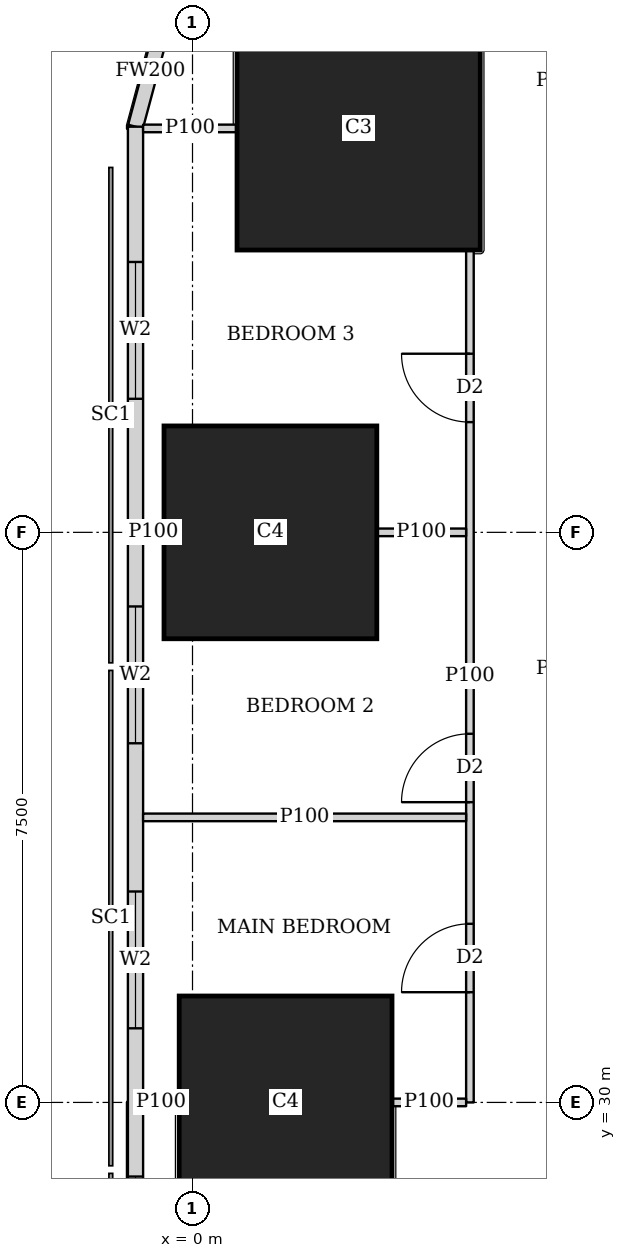
"""IFC4 building model, lengths in metres.
Left out: names, types, materials, properties, quantities, classifications, styles, units other than length and angle.
Written with IfcOpenShell. Run it as: python <this file> out.ifc"""

import sys

from ifc_helpers import new_model, si_unit, direction, frame, frame_2d, origin, origin_2d, place, context, subcontext, project, spatial, rectangle, extrude, element, fill, save


model = new_model("IFC4")
c1 = context("Model", 3, precision=1e-05, world=origin(), true_north=direction((0.0, 1.0)))
c2 = subcontext(c1, "Body", "Model", "MODEL_VIEW")
j1 = project(units=[si_unit("LENGTHUNIT", "METRE"), si_unit("PLANEANGLEUNIT", "RADIAN")], contexts=[c1])
p1 = place(None, origin())
s1 = spatial("IfcSite", under=j1, at=p1, CompositionType="ELEMENT")
p2 = place(p1, origin())
s2 = spatial("IfcBuilding", under=s1, at=p2, CompositionType="ELEMENT")
p3 = place(p2, frame((0.0, 0.0, 68.75)))
s3 = spatial("IfcBuildingStorey", under=s2, at=p3, CompositionType="ELEMENT", Elevation=68.75)
for number, where, z_axis, x_axis in (
    (1, (1.225, 30.0, 0.0), (0.0, 0.0, 1.0), (1.0, 0.0, 0.0)),
    (2, (1.025, 37.5, 0.0), (0.0, 0.0, 1.0), (1.0, 0.0, 0.0)),
):
    element("IfcColumn", number, at=place(p3, frame(where, z_axis=z_axis, x_axis=x_axis)), inside=s3, PredefinedType="COLUMN", context=c2, shape_type="SweptSolid", body=[
        extrude(rectangle(XDim=2.8, YDim=2.8, at=origin_2d()), origin(), (0.0, 0.0, 1.0), 3.75),
    ])
p4 = place(p3, frame((2.186, 42.814, 0.0), z_axis=(0.0, 0.0, 1.0), x_axis=(1.0, 0.0, 0.0)))
e3 = element("IfcColumn", 3, at=p4, inside=s3, PredefinedType="COLUMN", context=c2, shape_type="SweptSolid", body=[
    extrude(rectangle(XDim=3.2, YDim=3.2, at=origin_2d()), origin(), (0.0, 0.0, 1.0), 3.75),
])
p5 = place(p3, frame((-0.358, 44.298, 0.0), z_axis=(0.0, 0.0, 1.0), x_axis=(-0.259168954497, -0.965832000415, 0.0)))
e4 = element("IfcWall", 4, at=p5, inside=s3, PredefinedType="SOLIDWALL", context=c2, shape_type="SweptSolid", body=[
    extrude(rectangle(XDim=1.513, YDim=0.2, at=frame_2d((0.756, 0.0))), origin(), (0.0, 0.0, 1.0), 3.45),
])
p6 = place(p3, frame((-0.75, 42.837, 0.0), z_axis=(0.0, 0.0, 1.0), x_axis=(0.0, -1.0, 0.0)))
e5 = element("IfcWall", 5, at=p6, inside=s3, PredefinedType="SOLIDWALL", context=c2, shape_type="SweptSolid", body=[
    extrude(rectangle(XDim=40.674, YDim=0.2, at=frame_2d((20.337, 0.0))), origin(), (0.0, 0.0, 1.0), 3.45),
])
p7 = place(p6, frame((1.78, 0.0, 0.9)))
e6 = element("IfcOpeningElement", 6, at=p7, cuts=e5, PredefinedType="OPENING", context=c2, shape_type="SweptSolid", body=[
    extrude(rectangle(XDim=1.8, YDim=1.5, at=frame_2d((0.9, 0.75))), frame((0.0, 0.11, 0.0), z_axis=(0.0, -1.0, 0.0), x_axis=(1.0, 0.0, 0.0)), (0.0, 0.0, 1.0), 0.22),
])
p8 = place(p6, frame((6.312, 0.0, 0.9)))
e7 = element("IfcOpeningElement", 7, at=p8, cuts=e5, PredefinedType="OPENING", context=c2, shape_type="SweptSolid", body=[
    extrude(rectangle(XDim=1.8, YDim=1.5, at=frame_2d((0.9, 0.75))), frame((0.0, 0.11, 0.0), z_axis=(0.0, -1.0, 0.0), x_axis=(1.0, 0.0, 0.0)), (0.0, 0.0, 1.0), 0.22),
])
p9 = place(p6, frame((10.062, 0.0, 0.9)))
e8 = element("IfcOpeningElement", 8, at=p9, cuts=e5, PredefinedType="OPENING", context=c2, shape_type="SweptSolid", body=[
    extrude(rectangle(XDim=1.8, YDim=1.5, at=frame_2d((0.9, 0.75))), frame((0.0, 0.11, 0.0), z_axis=(0.0, -1.0, 0.0), x_axis=(1.0, 0.0, 0.0)), (0.0, 0.0, 1.0), 0.22),
])
p10 = place(p6, frame((13.812, 0.0, 0.9)))
e9 = element("IfcOpeningElement", 9, at=p10, cuts=e5, PredefinedType="OPENING", context=c2, shape_type="SweptSolid", body=[
    extrude(rectangle(XDim=1.8, YDim=1.5, at=frame_2d((0.9, 0.75))), frame((0.0, 0.11, 0.0), z_axis=(0.0, -1.0, 0.0), x_axis=(1.0, 0.0, 0.0)), (0.0, 0.0, 1.0), 0.22),
])
p11 = place(p6, frame((17.562, 0.0, 0.9)))
e10 = element("IfcOpeningElement", 10, at=p11, cuts=e5, PredefinedType="OPENING", context=c2, shape_type="SweptSolid", body=[
    extrude(rectangle(XDim=1.8, YDim=1.5, at=frame_2d((0.9, 0.75))), frame((0.0, 0.11, 0.0), z_axis=(0.0, -1.0, 0.0), x_axis=(1.0, 0.0, 0.0)), (0.0, 0.0, 1.0), 0.22),
])
p12 = place(p6, frame((21.312, 0.0, 0.9)))
e11 = element("IfcOpeningElement", 11, at=p12, cuts=e5, PredefinedType="OPENING", context=c2, shape_type="SweptSolid", body=[
    extrude(rectangle(XDim=1.8, YDim=1.5, at=frame_2d((0.9, 0.75))), frame((0.0, 0.11, 0.0), z_axis=(0.0, -1.0, 0.0), x_axis=(1.0, 0.0, 0.0)), (0.0, 0.0, 1.0), 0.22),
])
p13 = place(p6, frame((25.062, 0.0, 0.9)))
e12 = element("IfcOpeningElement", 12, at=p13, cuts=e5, PredefinedType="OPENING", context=c2, shape_type="SweptSolid", body=[
    extrude(rectangle(XDim=1.8, YDim=1.5, at=frame_2d((0.9, 0.75))), frame((0.0, 0.11, 0.0), z_axis=(0.0, -1.0, 0.0), x_axis=(1.0, 0.0, 0.0)), (0.0, 0.0, 1.0), 0.22),
])
p14 = place(p6, frame((28.812, 0.0, 0.9)))
e13 = element("IfcOpeningElement", 13, at=p14, cuts=e5, PredefinedType="OPENING", context=c2, shape_type="SweptSolid", body=[
    extrude(rectangle(XDim=1.8, YDim=1.5, at=frame_2d((0.9, 0.75))), frame((0.0, 0.11, 0.0), z_axis=(0.0, -1.0, 0.0), x_axis=(1.0, 0.0, 0.0)), (0.0, 0.0, 1.0), 0.22),
])
p15 = place(p6, frame((32.562, 0.0, 0.9)))
e14 = element("IfcOpeningElement", 14, at=p15, cuts=e5, PredefinedType="OPENING", context=c2, shape_type="SweptSolid", body=[
    extrude(rectangle(XDim=1.8, YDim=1.5, at=frame_2d((0.9, 0.75))), frame((0.0, 0.11, 0.0), z_axis=(0.0, -1.0, 0.0), x_axis=(1.0, 0.0, 0.0)), (0.0, 0.0, 1.0), 0.22),
])
p16 = place(p6, frame((37.094, 0.0, 0.9)))
e15 = element("IfcOpeningElement", 15, at=p16, cuts=e5, PredefinedType="OPENING", context=c2, shape_type="SweptSolid", body=[
    extrude(rectangle(XDim=1.8, YDim=1.5, at=frame_2d((0.9, 0.75))), frame((0.0, 0.11, 0.0), z_axis=(0.0, -1.0, 0.0), x_axis=(1.0, 0.0, 0.0)), (0.0, 0.0, 1.0), 0.22),
])
p17 = place(p3, frame((3.65, 30.0, 0.0), z_axis=(0.0, 0.0, 1.0), x_axis=(0.0, 1.0, 0.0)))
e16 = element("IfcWall", 16, at=p17, inside=s3, PredefinedType="PARTITIONING", context=c2, shape_type="SweptSolid", body=[
    extrude(rectangle(XDim=11.213, YDim=0.1, at=frame_2d((5.606, 0.0))), origin(), (0.0, 0.0, 1.0), 3.45),
])
p18 = place(p17, frame((1.45, 0.0, 0.0)))
e17 = element("IfcOpeningElement", 17, at=p18, cuts=e16, PredefinedType="OPENING", context=c2, shape_type="SweptSolid", body=[
    extrude(rectangle(XDim=0.9, YDim=2.1, at=frame_2d((0.45, 1.05))), frame((0.0, 0.06, 0.0), z_axis=(0.0, -1.0, 0.0), x_axis=(1.0, 0.0, 0.0)), (0.0, 0.0, 1.0), 0.12),
])
p19 = place(p17, frame((3.95, 0.0, 0.0)))
e18 = element("IfcOpeningElement", 18, at=p19, cuts=e16, PredefinedType="OPENING", context=c2, shape_type="SweptSolid", body=[
    extrude(rectangle(XDim=0.9, YDim=2.1, at=frame_2d((0.45, 1.05))), frame((0.0, 0.06, 0.0), z_axis=(0.0, -1.0, 0.0), x_axis=(1.0, 0.0, 0.0)), (0.0, 0.0, 1.0), 0.12),
])
p20 = place(p17, frame((8.95, 0.0, 0.0)))
e19 = element("IfcOpeningElement", 19, at=p20, cuts=e16, PredefinedType="OPENING", context=c2, shape_type="SweptSolid", body=[
    extrude(rectangle(XDim=0.9, YDim=2.1, at=frame_2d((0.45, 1.05))), frame((0.0, 0.06, 0.0), z_axis=(0.0, -1.0, 0.0), x_axis=(1.0, 0.0, 0.0)), (0.0, 0.0, 1.0), 0.12),
])
p21 = place(p3, frame((-0.65, 30.0, 0.0), z_axis=(0.0, 0.0, 1.0), x_axis=(1.0, 0.0, 0.0)))
e20 = element("IfcWall", 20, at=p21, inside=s3, PredefinedType="PARTITIONING", context=c2, shape_type="SweptSolid", body=[
    extrude(rectangle(XDim=0.474, YDim=0.1, at=frame_2d((0.237, 0.0))), origin(), (0.0, 0.0, 1.0), 3.45),
])
p22 = place(p3, frame((2.626, 30.0, 0.0), z_axis=(0.0, 0.0, 1.0), x_axis=(1.0, 0.0, 0.0)))
e21 = element("IfcWall", 21, at=p22, inside=s3, PredefinedType="PARTITIONING", context=c2, shape_type="SweptSolid", body=[
    extrude(rectangle(XDim=0.974, YDim=0.1, at=frame_2d((0.487, 0.0))), origin(), (0.0, 0.0, 1.0), 3.45),
])
p23 = place(p3, frame((-0.65, 33.75, 0.0), z_axis=(0.0, 0.0, 1.0), x_axis=(1.0, 0.0, 0.0)))
e22 = element("IfcWall", 22, at=p23, inside=s3, PredefinedType="PARTITIONING", context=c2, shape_type="SweptSolid", body=[
    extrude(rectangle(XDim=4.25, YDim=0.1, at=frame_2d((2.125, 0.0))), origin(), (0.0, 0.0, 1.0), 2.0),
])
p24 = place(p3, frame((-0.65, 37.5, 0.0), z_axis=(0.0, 0.0, 1.0), x_axis=(1.0, 0.0, 0.0)))
e23 = element("IfcWall", 23, at=p24, inside=s3, PredefinedType="PARTITIONING", context=c2, shape_type="SweptSolid", body=[
    extrude(rectangle(XDim=0.274, YDim=0.1, at=frame_2d((0.137, 0.0))), origin(), (0.0, 0.0, 1.0), 3.45),
])
p25 = place(p3, frame((2.426, 37.5, 0.0), z_axis=(0.0, 0.0, 1.0), x_axis=(1.0, 0.0, 0.0)))
e24 = element("IfcWall", 24, at=p25, inside=s3, PredefinedType="PARTITIONING", context=c2, shape_type="SweptSolid", body=[
    extrude(rectangle(XDim=1.174, YDim=0.1, at=frame_2d((0.587, 0.0))), origin(), (0.0, 0.0, 1.0), 2.0),
])
p26 = place(p3, frame((-0.65, 42.814, 0.0), z_axis=(0.0, 0.0, 1.0), x_axis=(1.0, 0.0, 0.0)))
e25 = element("IfcWall", 25, at=p26, inside=s3, PredefinedType="PARTITIONING", context=c2, shape_type="SweptSolid", body=[
    extrude(rectangle(XDim=1.235, YDim=0.1, at=frame_2d((0.617, 0.0))), origin(), (0.0, 0.0, 1.0), 3.45),
])
p27 = place(p7, origin())
e26 = element("IfcWindow", 26, at=p27, inside=s3, PartitioningType="SINGLE_PANEL", PredefinedType="WINDOW", context=c2, shape_type="SweptSolid", body=[
    extrude(rectangle(XDim=1.8, YDim=1.5, at=frame_2d((0.9, 0.75))), frame((0.0, 0.03, 0.0), z_axis=(0.0, -1.0, 0.0), x_axis=(1.0, 0.0, 0.0)), (0.0, 0.0, 1.0), 0.06),
])
fill(e6, e26)
p28 = place(p8, origin())
e27 = element("IfcWindow", 27, at=p28, inside=s3, PartitioningType="SINGLE_PANEL", PredefinedType="WINDOW", context=c2, shape_type="SweptSolid", body=[
    extrude(rectangle(XDim=1.8, YDim=1.5, at=frame_2d((0.9, 0.75))), frame((0.0, 0.03, 0.0), z_axis=(0.0, -1.0, 0.0), x_axis=(1.0, 0.0, 0.0)), (0.0, 0.0, 1.0), 0.06),
])
fill(e7, e27)
p29 = place(p9, origin())
e28 = element("IfcWindow", 28, at=p29, inside=s3, PartitioningType="SINGLE_PANEL", PredefinedType="WINDOW", context=c2, shape_type="SweptSolid", body=[
    extrude(rectangle(XDim=1.8, YDim=1.5, at=frame_2d((0.9, 0.75))), frame((0.0, 0.03, 0.0), z_axis=(0.0, -1.0, 0.0), x_axis=(1.0, 0.0, 0.0)), (0.0, 0.0, 1.0), 0.06),
])
fill(e8, e28)
p30 = place(p10, origin())
e29 = element("IfcWindow", 29, at=p30, inside=s3, PartitioningType="SINGLE_PANEL", PredefinedType="WINDOW", context=c2, shape_type="SweptSolid", body=[
    extrude(rectangle(XDim=1.8, YDim=1.5, at=frame_2d((0.9, 0.75))), frame((0.0, 0.03, 0.0), z_axis=(0.0, -1.0, 0.0), x_axis=(1.0, 0.0, 0.0)), (0.0, 0.0, 1.0), 0.06),
])
fill(e9, e29)
p31 = place(p18, origin())
e30 = element("IfcDoor", 30, at=p31, inside=s3, OperationType="SINGLE_SWING_LEFT", PredefinedType="DOOR", context=c2, shape_type="SweptSolid", body=[
    extrude(rectangle(XDim=0.9, YDim=2.1, at=frame_2d((0.45, 1.05))), frame((0.0, 0.025, 0.0), z_axis=(0.0, -1.0, 0.0), x_axis=(1.0, 0.0, 0.0)), (0.0, 0.0, 1.0), 0.05),
])
fill(e17, e30)
p32 = place(p19, origin())
e31 = element("IfcDoor", 31, at=p32, inside=s3, OperationType="SINGLE_SWING_LEFT", PredefinedType="DOOR", context=c2, shape_type="SweptSolid", body=[
    extrude(rectangle(XDim=0.9, YDim=2.1, at=frame_2d((0.45, 1.05))), frame((0.0, 0.025, 0.0), z_axis=(0.0, -1.0, 0.0), x_axis=(1.0, 0.0, 0.0)), (0.0, 0.0, 1.0), 0.05),
])
fill(e18, e31)
p33 = place(p20, origin())
e32 = element("IfcDoor", 32, at=p33, inside=s3, OperationType="SINGLE_SWING_RIGHT", PredefinedType="DOOR", context=c2, shape_type="SweptSolid", body=[
    extrude(rectangle(XDim=0.9, YDim=2.1, at=frame_2d((0.45, 1.05))), frame((0.0, 0.025, 0.0), z_axis=(0.0, -1.0, 0.0), x_axis=(1.0, 0.0, 0.0)), (0.0, 0.0, 1.0), 0.05),
])
fill(e19, e32)
save(model, sys.argv[1])
